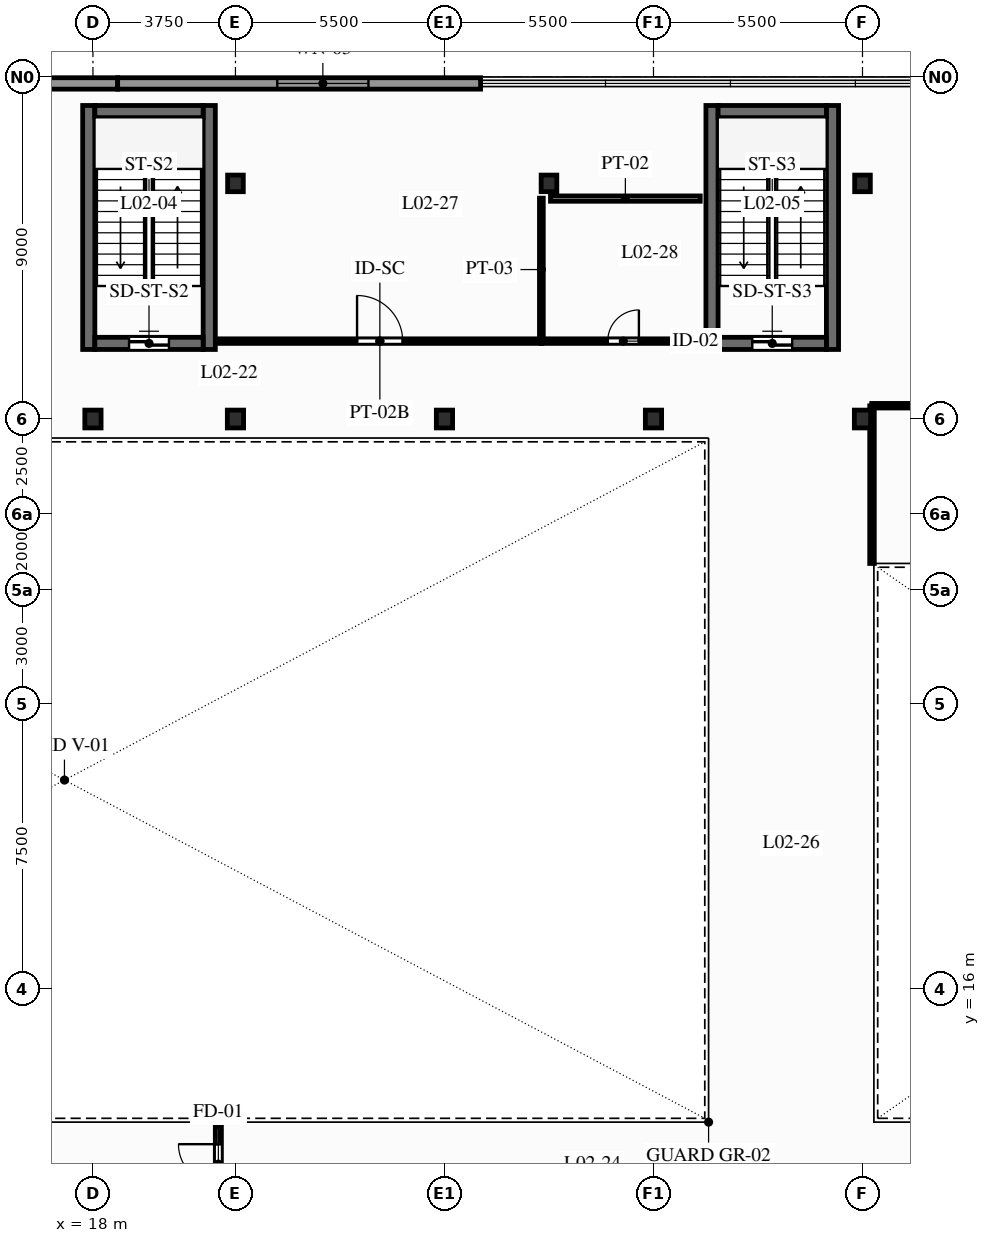
"""IFC4 building model, lengths in metres.
Left out: names, types, materials, properties, quantities, classifications, styles, units other than length and angle.
Written with IfcOpenShell. Run it as: python <this file> out.ifc"""

import sys

from ifc_helpers import new_model, si_unit, direction, frame, frame_2d, origin, origin_2d, place, context, subcontext, project, spatial, rectangle, i_section, extrude, element, fill, save


model = new_model("IFC4")
c1 = context("Model", 3, precision=1e-05, world=origin(), true_north=direction((0.0, 1.0)))
c2 = subcontext(c1, "Body", "Model", "MODEL_VIEW")
j1 = project(units=[si_unit("LENGTHUNIT", "METRE"), si_unit("PLANEANGLEUNIT", "RADIAN")], contexts=[c1])
p1 = place(None, origin())
s1 = spatial("IfcSite", under=j1, at=p1, CompositionType="ELEMENT")
p2 = place(p1, origin())
s2 = spatial("IfcBuilding", under=s1, at=p2, CompositionType="ELEMENT")
p3 = place(p2, frame((0.0, 0.0, 9.0)))
s3 = spatial("IfcBuildingStorey", under=s2, at=p3, CompositionType="ELEMENT", Elevation=9.0)
for number, where, z_axis, x_axis in (
    (1, (18.0, 31.0, 0.0), (0.0, 0.0, 1.0), (1.0, 0.0, 0.0)),
    (2, (21.75, 31.0, 0.0), (0.0, 0.0, 1.0), (1.0, 0.0, 0.0)),
):
    element("IfcColumn", number, at=place(p3, frame(where, z_axis=z_axis, x_axis=x_axis)), inside=s3, PredefinedType="COLUMN", context=c2, shape_type="SweptSolid", body=[
        extrude(i_section(OverallWidth=0.428, OverallDepth=0.469, WebThickness=0.078, FlangeThickness=0.125, FilletRadius=0.015, at=origin_2d()), origin(), (0.0, 0.0, 1.0), 4.5),
    ])
p4 = place(p3, frame((21.75, 37.2, 0.0), z_axis=(0.0, 0.0, 1.0), x_axis=(1.0, 0.0, 0.0)))
e3 = element("IfcColumn", 3, at=p4, inside=s3, PredefinedType="COLUMN", context=c2, shape_type="SweptSolid", body=[
    extrude(i_section(OverallWidth=0.412, OverallDepth=0.437, WebThickness=0.036, FlangeThickness=0.058, FilletRadius=0.015, at=origin_2d()), origin(), (0.0, 0.0, 1.0), 4.5),
])
p5 = place(p3, frame((27.25, 31.0, 0.0), z_axis=(0.0, 0.0, 1.0), x_axis=(1.0, 0.0, 0.0)))
e4 = element("IfcColumn", 4, at=p5, inside=s3, PredefinedType="COLUMN", context=c2, shape_type="SweptSolid", body=[
    extrude(i_section(OverallWidth=0.428, OverallDepth=0.469, WebThickness=0.078, FlangeThickness=0.125, FilletRadius=0.015, at=origin_2d()), origin(), (0.0, 0.0, 1.0), 4.5),
])
p6 = place(p3, frame((30.0, 37.2, 0.0), z_axis=(0.0, 0.0, 1.0), x_axis=(1.0, 0.0, 0.0)))
e5 = element("IfcColumn", 5, at=p6, inside=s3, PredefinedType="COLUMN", context=c2, shape_type="SweptSolid", body=[
    extrude(i_section(OverallWidth=0.412, OverallDepth=0.437, WebThickness=0.036, FlangeThickness=0.058, FilletRadius=0.015, at=origin_2d()), origin(), (0.0, 0.0, 1.0), 4.5),
])
for number, where, z_axis, x_axis in (
    (6, (32.75, 31.0, 0.0), (0.0, 0.0, 1.0), (1.0, 0.0, 0.0)),
    (7, (38.25, 31.0, 0.0), (0.0, 0.0, 1.0), (1.0, 0.0, 0.0)),
):
    element("IfcColumn", number, at=place(p3, frame(where, z_axis=z_axis, x_axis=x_axis)), inside=s3, PredefinedType="COLUMN", context=c2, shape_type="SweptSolid", body=[
        extrude(i_section(OverallWidth=0.428, OverallDepth=0.469, WebThickness=0.078, FlangeThickness=0.125, FilletRadius=0.015, at=origin_2d()), origin(), (0.0, 0.0, 1.0), 4.5),
    ])
p7 = place(p3, frame((38.25, 37.2, 0.0), z_axis=(0.0, 0.0, 1.0), x_axis=(1.0, 0.0, 0.0)))
e8 = element("IfcColumn", 8, at=p7, inside=s3, PredefinedType="COLUMN", context=c2, shape_type="SweptSolid", body=[
    extrude(i_section(OverallWidth=0.412, OverallDepth=0.437, WebThickness=0.036, FlangeThickness=0.058, FilletRadius=0.015, at=origin_2d()), origin(), (0.0, 0.0, 1.0), 4.5),
])
p8 = place(p3, frame((7.1, 39.83, 0.0), z_axis=(0.0, 0.0, 1.0), x_axis=(1.0, 0.0, 0.0)))
e9 = element("IfcWall", 9, at=p8, inside=s3, PredefinedType="STANDARD", context=c2, shape_type="SweptSolid", body=[
    extrude(rectangle(XDim=11.55, YDim=0.3, at=frame_2d((5.775, 0.0))), origin(), (0.0, 0.0, 1.0), 4.22),
])
p9 = place(p3, frame((18.65, 39.83, 0.0), z_axis=(0.0, 0.0, 1.0), x_axis=(1.0, 0.0, 0.0)))
e10 = element("IfcWall", 10, at=p9, inside=s3, PredefinedType="STANDARD", context=c2, shape_type="SweptSolid", body=[
    extrude(rectangle(XDim=9.55, YDim=0.3, at=frame_2d((4.775, 0.0))), origin(), (0.0, 0.0, 1.0), 4.22),
])
p10 = place(p9, frame((4.2, 0.0, 0.9)))
e11 = element("IfcOpeningElement", 11, at=p10, cuts=e10, PredefinedType="OPENING", context=c2, shape_type="SweptSolid", body=[
    extrude(rectangle(XDim=2.4, YDim=2.15, at=frame_2d((1.2, 1.075))), frame((0.0, 0.16, 0.0), z_axis=(0.0, -1.0, 0.0), x_axis=(1.0, 0.0, 0.0)), (0.0, 0.0, 1.0), 0.32),
])
for number, where, z_axis, x_axis in (
    (12, (17.89, 32.83, 0.0), (0.0, 0.0, 1.0), (0.0, 1.0, 0.0)),
    (13, (21.06, 32.83, 0.0), (0.0, 0.0, 1.0), (0.0, 1.0, 0.0)),
):
    element("IfcWall", number, at=place(p3, frame(where, z_axis=z_axis, x_axis=x_axis)), inside=s3, PredefinedType="SHEAR", context=c2, shape_type="SweptSolid", body=[
        extrude(rectangle(XDim=6.42, YDim=0.32, at=frame_2d((3.21, 0.0))), origin(), (0.0, 0.0, 1.0), 4.22),
    ])
p11 = place(p3, frame((18.05, 32.99, 0.0), z_axis=(0.0, 0.0, 1.0), x_axis=(1.0, 0.0, 0.0)))
e14 = element("IfcWall", 14, at=p11, inside=s3, PredefinedType="SHEAR", context=c2, shape_type="SweptSolid", body=[
    extrude(rectangle(XDim=2.85, YDim=0.32, at=frame_2d((1.425, 0.0))), origin(), (0.0, 0.0, 1.0), 4.22),
])
p12 = place(p11, frame((0.9, 0.0, 0.0)))
e15 = element("IfcOpeningElement", 15, at=p12, cuts=e14, PredefinedType="OPENING", context=c2, shape_type="SweptSolid", body=[
    extrude(rectangle(XDim=1.05, YDim=2.06, at=frame_2d((0.525, 1.03))), frame((0.0, 0.17, 0.0), z_axis=(0.0, -1.0, 0.0), x_axis=(1.0, 0.0, 0.0)), (0.0, 0.0, 1.0), 0.34),
])
p13 = place(p3, frame((20.9, 39.09, 0.0), z_axis=(0.0, 0.0, 1.0), x_axis=(-1.0, 0.0, 0.0)))
e16 = element("IfcWall", 16, at=p13, inside=s3, PredefinedType="SHEAR", context=c2, shape_type="SweptSolid", body=[
    extrude(rectangle(XDim=2.85, YDim=0.32, at=frame_2d((1.425, 0.0))), origin(), (0.0, 0.0, 1.0), 4.22),
])
for number, where, z_axis, x_axis in (
    (17, (34.29, 32.83, 0.0), (0.0, 0.0, 1.0), (0.0, 1.0, 0.0)),
    (18, (37.46, 32.83, 0.0), (0.0, 0.0, 1.0), (0.0, 1.0, 0.0)),
):
    element("IfcWall", number, at=place(p3, frame(where, z_axis=z_axis, x_axis=x_axis)), inside=s3, PredefinedType="SHEAR", context=c2, shape_type="SweptSolid", body=[
        extrude(rectangle(XDim=6.42, YDim=0.32, at=frame_2d((3.21, 0.0))), origin(), (0.0, 0.0, 1.0), 4.22),
    ])
p14 = place(p3, frame((34.45, 32.99, 0.0), z_axis=(0.0, 0.0, 1.0), x_axis=(1.0, 0.0, 0.0)))
e19 = element("IfcWall", 19, at=p14, inside=s3, PredefinedType="SHEAR", context=c2, shape_type="SweptSolid", body=[
    extrude(rectangle(XDim=2.85, YDim=0.32, at=frame_2d((1.425, 0.0))), origin(), (0.0, 0.0, 1.0), 4.22),
])
p15 = place(p14, frame((0.9, 0.0, 0.0)))
e20 = element("IfcOpeningElement", 20, at=p15, cuts=e19, PredefinedType="OPENING", context=c2, shape_type="SweptSolid", body=[
    extrude(rectangle(XDim=1.05, YDim=2.06, at=frame_2d((0.525, 1.03))), frame((0.0, 0.17, 0.0), z_axis=(0.0, -1.0, 0.0), x_axis=(1.0, 0.0, 0.0)), (0.0, 0.0, 1.0), 0.34),
])
p16 = place(p3, frame((37.3, 39.09, 0.0), z_axis=(0.0, 0.0, 1.0), x_axis=(-1.0, 0.0, 0.0)))
e21 = element("IfcWall", 21, at=p16, inside=s3, PredefinedType="SHEAR", context=c2, shape_type="SweptSolid", body=[
    extrude(rectangle(XDim=2.85, YDim=0.32, at=frame_2d((1.425, 0.0))), origin(), (0.0, 0.0, 1.0), 4.22),
])
p17 = place(p3, frame((21.3, 10.389, 0.0), z_axis=(0.0, 0.0, 1.0), x_axis=(0.0, 1.0, 0.0)))
e22 = element("IfcWall", 22, at=p17, inside=s3, PredefinedType="PARTITIONING", context=c2, shape_type="SweptSolid", body=[
    extrude(rectangle(XDim=2.011, YDim=0.16, at=frame_2d((1.006, 0.0))), origin(), (0.0, 0.0, 1.0), 4.22),
])
p18 = place(p17, frame((0.481, 0.0, 0.0)))
e23 = element("IfcOpeningElement", 23, at=p18, cuts=e22, PredefinedType="OPENING", context=c2, shape_type="SweptSolid", body=[
    extrude(rectangle(XDim=1.05, YDim=2.06, at=frame_2d((0.525, 1.03))), frame((0.0, 0.09, 0.0), z_axis=(0.0, -1.0, 0.0), x_axis=(1.0, 0.0, 0.0)), (0.0, 0.0, 1.0), 0.18),
])
p19 = place(p3, frame((21.289, 33.05, 0.0), z_axis=(0.0, 0.0, 1.0), x_axis=(1.0, 0.0, 0.0)))
e24 = element("IfcWall", 24, at=p19, inside=s3, PredefinedType="PARTITIONING", context=c2, shape_type="SweptSolid", body=[
    extrude(rectangle(XDim=8.522, YDim=0.12, at=frame_2d((4.261, 0.0))), origin(), (0.0, 0.0, 1.0), 3.344),
])
p20 = place(p19, frame((3.661, 0.0, 0.0)))
e25 = element("IfcOpeningElement", 25, at=p20, cuts=e24, PredefinedType="OPENING", context=c2, shape_type="SweptSolid", body=[
    extrude(rectangle(XDim=1.2, YDim=2.08, at=frame_2d((0.6, 1.04))), frame((0.0, 0.07, 0.0), z_axis=(0.0, -1.0, 0.0), x_axis=(1.0, 0.0, 0.0)), (0.0, 0.0, 1.0), 0.14),
])
p21 = place(p3, frame((29.793, 33.05, 0.0), z_axis=(0.0, 0.0, 1.0), x_axis=(1.0, 0.0, 0.0)))
e26 = element("IfcWall", 26, at=p21, inside=s3, PredefinedType="PARTITIONING", context=c2, shape_type="SweptSolid", body=[
    extrude(rectangle(XDim=4.327, YDim=0.12, at=frame_2d((2.164, 0.0))), origin(), (0.0, 0.0, 1.0), 4.22),
])
p22 = place(p21, frame((1.754, 0.0, 0.0)))
e27 = element("IfcOpeningElement", 27, at=p22, cuts=e26, PredefinedType="OPENING", context=c2, shape_type="SweptSolid", body=[
    extrude(rectangle(XDim=0.82, YDim=2.02, at=frame_2d((0.41, 1.01))), frame((0.0, 0.07, 0.0), z_axis=(0.0, -1.0, 0.0), x_axis=(1.0, 0.0, 0.0)), (0.0, 0.0, 1.0), 0.14),
])
p23 = place(p3, frame((38.493, 31.35, 0.0), z_axis=(0.0, 0.0, 1.0), x_axis=(1.0, 0.0, 0.0)))
e28 = element("IfcWall", 28, at=p23, inside=s3, PredefinedType="PARTITIONING", context=c2, shape_type="SweptSolid", body=[
    extrude(rectangle(XDim=20.865, YDim=0.12, at=frame_2d((10.432, 0.0))), origin(), (0.0, 0.0, 1.0), 3.344),
])
p24 = place(p23, frame((10.052, 0.0, 0.0)))
e29 = element("IfcOpeningElement", 29, at=p24, cuts=e28, PredefinedType="OPENING", context=c2, shape_type="SweptSolid", body=[
    extrude(rectangle(XDim=1.2, YDim=2.08, at=frame_2d((0.6, 1.04))), frame((0.0, 0.07, 0.0), z_axis=(0.0, -1.0, 0.0), x_axis=(1.0, 0.0, 0.0)), (0.0, 0.0, 1.0), 0.14),
])
p25 = place(p3, frame((38.5, 27.199, 0.0), z_axis=(0.0, 0.0, 1.0), x_axis=(0.0, 1.0, 0.0)))
e30 = element("IfcWall", 30, at=p25, inside=s3, PredefinedType="PARTITIONING", context=c2, shape_type="SweptSolid", body=[
    extrude(rectangle(XDim=4.146, YDim=0.12, at=frame_2d((2.073, 0.0))), origin(), (0.0, 0.0, 1.0), 3.344),
])
p26 = place(p3, frame((29.8, 33.054, 0.0), z_axis=(0.0, 0.0, 1.0), x_axis=(0.0, 1.0, 0.0)))
e31 = element("IfcWall", 31, at=p26, inside=s3, PredefinedType="PARTITIONING", context=c2, shape_type="SweptSolid", body=[
    extrude(rectangle(XDim=3.757, YDim=0.1, at=frame_2d((1.879, 0.0))), origin(), (0.0, 0.0, 1.0), 3.738),
])
p27 = place(p3, frame((30.04, 36.8, 0.0), z_axis=(0.0, 0.0, 1.0), x_axis=(1.0, 0.0, 0.0)))
e32 = element("IfcWall", 32, at=p27, inside=s3, PredefinedType="PARTITIONING", context=c2, shape_type="SweptSolid", body=[
    extrude(rectangle(XDim=3.94, YDim=0.14, at=frame_2d((1.97, 0.0))), origin(), (0.0, 0.0, 1.0), 4.22),
])
p28 = place(p10, origin())
e33 = element("IfcWindow", 33, at=p28, inside=s3, PartitioningType="SINGLE_PANEL", PredefinedType="WINDOW", context=c2, shape_type="SweptSolid", body=[
    extrude(rectangle(XDim=2.4, YDim=2.15, at=frame_2d((1.2, 1.075))), frame((0.0, 0.03, 0.0), z_axis=(0.0, -1.0, 0.0), x_axis=(1.0, 0.0, 0.0)), (0.0, 0.0, 1.0), 0.06),
])
fill(e11, e33)
p29 = place(p12, origin())
e34 = element("IfcDoor", 34, at=p29, inside=s3, OperationType="SINGLE_SWING_LEFT", PredefinedType="DOOR", context=c2, shape_type="SweptSolid", body=[
    extrude(rectangle(XDim=1.05, YDim=2.06, at=frame_2d((0.525, 1.03))), frame((0.0, 0.025, 0.0), z_axis=(0.0, -1.0, 0.0), x_axis=(1.0, 0.0, 0.0)), (0.0, 0.0, 1.0), 0.05),
])
fill(e15, e34)
p30 = place(p15, origin())
e35 = element("IfcDoor", 35, at=p30, inside=s3, OperationType="SINGLE_SWING_LEFT", PredefinedType="DOOR", context=c2, shape_type="SweptSolid", body=[
    extrude(rectangle(XDim=1.05, YDim=2.06, at=frame_2d((0.525, 1.03))), frame((0.0, 0.025, 0.0), z_axis=(0.0, -1.0, 0.0), x_axis=(1.0, 0.0, 0.0)), (0.0, 0.0, 1.0), 0.05),
])
fill(e20, e35)
p31 = place(p18, origin())
e36 = element("IfcDoor", 36, at=p31, inside=s3, OperationType="SINGLE_SWING_RIGHT", PredefinedType="DOOR", context=c2, shape_type="SweptSolid", body=[
    extrude(rectangle(XDim=1.05, YDim=2.06, at=frame_2d((0.525, 1.03))), frame((0.0, 0.025, 0.0), z_axis=(0.0, -1.0, 0.0), x_axis=(1.0, 0.0, 0.0)), (0.0, 0.0, 1.0), 0.05),
])
fill(e23, e36)
p32 = place(p20, origin())
e37 = element("IfcDoor", 37, at=p32, inside=s3, OperationType="SINGLE_SWING_LEFT", PredefinedType="DOOR", context=c2, shape_type="SweptSolid", body=[
    extrude(rectangle(XDim=1.2, YDim=2.08, at=frame_2d((0.6, 1.04))), frame((0.0, 0.025, 0.0), z_axis=(0.0, -1.0, 0.0), x_axis=(1.0, 0.0, 0.0)), (0.0, 0.0, 1.0), 0.05),
])
fill(e25, e37)
p33 = place(p22, origin())
e38 = element("IfcDoor", 38, at=p33, inside=s3, OperationType="SINGLE_SWING_RIGHT", PredefinedType="DOOR", context=c2, shape_type="SweptSolid", body=[
    extrude(rectangle(XDim=0.82, YDim=2.02, at=frame_2d((0.41, 1.01))), frame((0.0, 0.025, 0.0), z_axis=(0.0, -1.0, 0.0), x_axis=(1.0, 0.0, 0.0)), (0.0, 0.0, 1.0), 0.05),
])
fill(e27, e38)
save(model, sys.argv[1])
